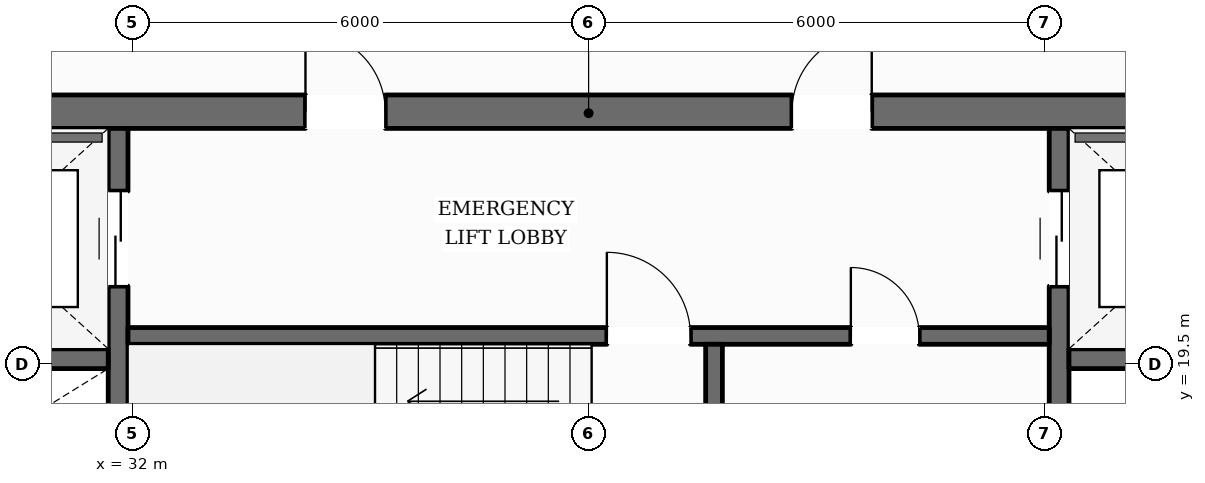
"""IFC4 building model, lengths in metres.
Left out: names, types, materials, properties, quantities, classifications, styles, units other than length and angle.
Written with IfcOpenShell. Run it as: python <this file> out.ifc"""

import sys

from ifc_helpers import new_model, si_unit, direction, frame, frame_2d, origin, place, context, subcontext, project, spatial, rectangle, extrude, element, fill, save


model = new_model("IFC4")
c1 = context("Model", 3, precision=1e-05, world=origin(), true_north=direction((0.0, 1.0)))
c2 = subcontext(c1, "Body", "Model", "MODEL_VIEW")
j1 = project(units=[si_unit("LENGTHUNIT", "METRE"), si_unit("PLANEANGLEUNIT", "RADIAN")], contexts=[c1])
p1 = place(None, origin())
s1 = spatial("IfcSite", under=j1, at=p1, CompositionType="ELEMENT")
p2 = place(p1, origin())
s2 = spatial("IfcBuilding", under=s1, at=p2, CompositionType="ELEMENT")
p3 = place(p2, frame((0.0, 0.0, 211.2)))
s3 = spatial("IfcBuildingStorey", under=s2, at=p3, CompositionType="ELEMENT", Elevation=211.2)
p4 = place(p3, frame((28.04, 22.82, 0.0), z_axis=(0.0, 0.0, 1.0), x_axis=(1.0, 0.0, 0.0)))
e1 = element("IfcWall", 1, at=p4, inside=s3, PredefinedType="SOLIDWALL", context=c2, shape_type="SweptSolid", body=[
    extrude(rectangle(XDim=19.92, YDim=0.44, at=frame_2d((9.96, 0.0))), origin(), (0.0, 0.0, 1.0), 3.6),
])
p5 = place(p4, frame((6.235, 0.0, 0.0)))
e2 = element("IfcOpeningElement", 2, at=p5, cuts=e1, PredefinedType="OPENING", context=c2, shape_type="SweptSolid", body=[
    extrude(rectangle(XDim=1.05, YDim=2.15, at=frame_2d((0.525, 1.075))), frame((0.0, 0.23, 0.0), z_axis=(0.0, -1.0, 0.0), x_axis=(1.0, 0.0, 0.0)), (0.0, 0.0, 1.0), 0.46),
])
p6 = place(p4, frame((12.635, 0.0, 0.0)))
e3 = element("IfcOpeningElement", 3, at=p6, cuts=e1, PredefinedType="OPENING", context=c2, shape_type="SweptSolid", body=[
    extrude(rectangle(XDim=1.05, YDim=2.15, at=frame_2d((0.525, 1.075))), frame((0.0, 0.23, 0.0), z_axis=(0.0, -1.0, 0.0), x_axis=(1.0, 0.0, 0.0)), (0.0, 0.0, 1.0), 0.46),
])
p7 = place(p3, frame((31.81, 9.6, 0.0), z_axis=(0.0, 0.0, 1.0), x_axis=(0.0, 1.0, 0.0)))
e4 = element("IfcWall", 4, at=p7, inside=s3, PredefinedType="SHEAR", context=c2, shape_type="SweptSolid", body=[
    extrude(rectangle(XDim=13.0, YDim=0.26, at=frame_2d((6.5, 0.0))), origin(), (0.0, 0.0, 1.0), 3.6),
])
p8 = place(p7, frame((10.925, 0.0, 0.0)))
e5 = element("IfcOpeningElement", 5, at=p8, cuts=e4, PredefinedType="OPENING", context=c2, shape_type="SweptSolid", body=[
    extrude(rectangle(XDim=1.25, YDim=2.25, at=frame_2d((0.625, 1.125))), frame((0.0, 0.14, 0.0), z_axis=(0.0, -1.0, 0.0), x_axis=(1.0, 0.0, 0.0)), (0.0, 0.0, 1.0), 0.28),
])
p9 = place(p3, frame((44.19, 9.6, 0.0), z_axis=(0.0, 0.0, 1.0), x_axis=(0.0, 1.0, 0.0)))
e6 = element("IfcWall", 6, at=p9, inside=s3, PredefinedType="SHEAR", context=c2, shape_type="SweptSolid", body=[
    extrude(rectangle(XDim=13.0, YDim=0.26, at=frame_2d((6.5, 0.0))), origin(), (0.0, 0.0, 1.0), 3.6),
])
p10 = place(p9, frame((10.925, 0.0, 0.0)))
e7 = element("IfcOpeningElement", 7, at=p10, cuts=e6, PredefinedType="OPENING", context=c2, shape_type="SweptSolid", body=[
    extrude(rectangle(XDim=1.25, YDim=2.25, at=frame_2d((0.625, 1.125))), frame((0.0, 0.14, 0.0), z_axis=(0.0, -1.0, 0.0), x_axis=(1.0, 0.0, 0.0)), (0.0, 0.0, 1.0), 0.28),
])
for number, where, z_axis, x_axis in (
    (8, (28.48, 19.57, 0.0), (0.0, 0.0, 1.0), (1.0, 0.0, 0.0)),
    (9, (44.32, 19.57, 0.0), (0.0, 0.0, 1.0), (1.0, 0.0, 0.0)),
):
    element("IfcWall", number, at=place(p3, frame(where, z_axis=z_axis, x_axis=x_axis)), inside=s3, PredefinedType="SHEAR", context=c2, shape_type="SweptSolid", body=[
        extrude(rectangle(XDim=3.2, YDim=0.26, at=frame_2d((1.6, 0.0))), origin(), (0.0, 0.0, 1.0), 3.6),
    ])
p11 = place(p3, frame((31.94, 19.87, 0.0), z_axis=(0.0, 0.0, 1.0), x_axis=(1.0, 0.0, 0.0)))
e10 = element("IfcWall", 10, at=p11, inside=s3, PredefinedType="SOLIDWALL", context=c2, shape_type="SweptSolid", body=[
    extrude(rectangle(XDim=12.12, YDim=0.22, at=frame_2d((6.06, 0.0))), origin(), (0.0, 0.0, 1.0), 3.6),
])
p12 = place(p11, frame((6.3, 0.0, 0.0)))
e11 = element("IfcOpeningElement", 11, at=p12, cuts=e10, PredefinedType="OPENING", context=c2, shape_type="SweptSolid", body=[
    extrude(rectangle(XDim=1.1, YDim=2.15, at=frame_2d((0.55, 1.075))), frame((0.0, 0.12, 0.0), z_axis=(0.0, -1.0, 0.0), x_axis=(1.0, 0.0, 0.0)), (0.0, 0.0, 1.0), 0.24),
])
p13 = place(p11, frame((9.51, 0.0, 0.0)))
e12 = element("IfcOpeningElement", 12, at=p13, cuts=e10, PredefinedType="OPENING", context=c2, shape_type="SweptSolid", body=[
    extrude(rectangle(XDim=0.9, YDim=2.1, at=frame_2d((0.45, 1.05))), frame((0.0, 0.12, 0.0), z_axis=(0.0, -1.0, 0.0), x_axis=(1.0, 0.0, 0.0)), (0.0, 0.0, 1.0), 0.24),
])
p14 = place(p3, frame((39.65, 16.56, 0.0), z_axis=(0.0, 0.0, 1.0), x_axis=(0.0, 1.0, 0.0)))
e13 = element("IfcWall", 13, at=p14, inside=s3, PredefinedType="SOLIDWALL", context=c2, shape_type="SweptSolid", body=[
    extrude(rectangle(XDim=3.2, YDim=0.22, at=frame_2d((1.6, 0.0))), origin(), (0.0, 0.0, 1.0), 3.6),
])
p15 = place(p3, frame((14.16, 10.888, 0.0), z_axis=(0.0, 0.0, 1.0), x_axis=(0.508058913236, 0.861322321017, 0.0)))
e14 = element("IfcWall", 14, at=p15, inside=s3, PredefinedType="STANDARD", context=c2, shape_type="SweptSolid", body=[
    extrude(rectangle(XDim=38.718, YDim=0.35, at=frame_2d((19.359, 0.0))), origin(), (0.0, 0.0, 1.0), 3.132),
])
p16 = place(p15, frame((34.374, 0.0, 0.65)))
e15 = element("IfcOpeningElement", 15, at=p16, cuts=e14, PredefinedType="OPENING", context=c2, shape_type="SweptSolid", body=[
    extrude(rectangle(XDim=1.45, YDim=1.75, at=frame_2d((0.725, 0.875))), frame((0.0, 0.185, 0.0), z_axis=(0.0, -1.0, 0.0), x_axis=(1.0, 0.0, 0.0)), (0.0, 0.0, 1.0), 0.37),
])
p17 = place(p15, frame((28.08, 0.0, 0.65)))
e16 = element("IfcOpeningElement", 16, at=p17, cuts=e14, PredefinedType="OPENING", context=c2, shape_type="SweptSolid", body=[
    extrude(rectangle(XDim=1.45, YDim=1.75, at=frame_2d((0.725, 0.875))), frame((0.0, 0.185, 0.0), z_axis=(0.0, -1.0, 0.0), x_axis=(1.0, 0.0, 0.0)), (0.0, 0.0, 1.0), 0.37),
])
p18 = place(p15, frame((15.491, 0.0, 0.65)))
e17 = element("IfcOpeningElement", 17, at=p18, cuts=e14, PredefinedType="OPENING", context=c2, shape_type="SweptSolid", body=[
    extrude(rectangle(XDim=1.45, YDim=1.75, at=frame_2d((0.725, 0.875))), frame((0.0, 0.185, 0.0), z_axis=(0.0, -1.0, 0.0), x_axis=(1.0, 0.0, 0.0)), (0.0, 0.0, 1.0), 0.37),
])
p19 = place(p15, frame((9.197, 0.0, 0.65)))
e18 = element("IfcOpeningElement", 18, at=p19, cuts=e14, PredefinedType="OPENING", context=c2, shape_type="SweptSolid", body=[
    extrude(rectangle(XDim=1.45, YDim=1.75, at=frame_2d((0.725, 0.875))), frame((0.0, 0.185, 0.0), z_axis=(0.0, -1.0, 0.0), x_axis=(1.0, 0.0, 0.0)), (0.0, 0.0, 1.0), 0.37),
])
p20 = place(p15, frame((2.903, 0.0, 0.65)))
e19 = element("IfcOpeningElement", 19, at=p20, cuts=e14, PredefinedType="OPENING", context=c2, shape_type="SweptSolid", body=[
    extrude(rectangle(XDim=1.45, YDim=1.75, at=frame_2d((0.725, 0.875))), frame((0.0, 0.185, 0.0), z_axis=(0.0, -1.0, 0.0), x_axis=(1.0, 0.0, 0.0)), (0.0, 0.0, 1.0), 0.37),
])
p21 = place(p3, frame((42.066, 44.299, 0.0), z_axis=(0.0, 0.0, 1.0), x_axis=(0.502188775534, -0.864758020331, 0.0)))
e20 = element("IfcWall", 20, at=p21, inside=s3, PredefinedType="STANDARD", context=c2, shape_type="SweptSolid", body=[
    extrude(rectangle(XDim=38.263, YDim=0.35, at=frame_2d((19.132, 0.0))), origin(), (0.0, 0.0, 1.0), 3.132),
])
p22 = place(p21, frame((33.948, 0.0, 0.65)))
e21 = element("IfcOpeningElement", 21, at=p22, cuts=e20, PredefinedType="OPENING", context=c2, shape_type="SweptSolid", body=[
    extrude(rectangle(XDim=1.45, YDim=1.75, at=frame_2d((0.725, 0.875))), frame((0.0, 0.185, 0.0), z_axis=(0.0, -1.0, 0.0), x_axis=(1.0, 0.0, 0.0)), (0.0, 0.0, 1.0), 0.37),
])
p23 = place(p21, frame((27.731, 0.0, 0.65)))
e22 = element("IfcOpeningElement", 22, at=p23, cuts=e20, PredefinedType="OPENING", context=c2, shape_type="SweptSolid", body=[
    extrude(rectangle(XDim=1.45, YDim=1.75, at=frame_2d((0.725, 0.875))), frame((0.0, 0.185, 0.0), z_axis=(0.0, -1.0, 0.0), x_axis=(1.0, 0.0, 0.0)), (0.0, 0.0, 1.0), 0.37),
])
p24 = place(p21, frame((15.297, 0.0, 0.65)))
e23 = element("IfcOpeningElement", 23, at=p24, cuts=e20, PredefinedType="OPENING", context=c2, shape_type="SweptSolid", body=[
    extrude(rectangle(XDim=1.45, YDim=1.75, at=frame_2d((0.725, 0.875))), frame((0.0, 0.185, 0.0), z_axis=(0.0, -1.0, 0.0), x_axis=(1.0, 0.0, 0.0)), (0.0, 0.0, 1.0), 0.37),
])
p25 = place(p21, frame((9.079, 0.0, 0.65)))
e24 = element("IfcOpeningElement", 24, at=p25, cuts=e20, PredefinedType="OPENING", context=c2, shape_type="SweptSolid", body=[
    extrude(rectangle(XDim=1.45, YDim=1.75, at=frame_2d((0.725, 0.875))), frame((0.0, 0.185, 0.0), z_axis=(0.0, -1.0, 0.0), x_axis=(1.0, 0.0, 0.0)), (0.0, 0.0, 1.0), 0.37),
])
p26 = place(p21, frame((2.862, 0.0, 0.65)))
e25 = element("IfcOpeningElement", 25, at=p26, cuts=e20, PredefinedType="OPENING", context=c2, shape_type="SweptSolid", body=[
    extrude(rectangle(XDim=1.45, YDim=1.75, at=frame_2d((0.725, 0.875))), frame((0.0, 0.185, 0.0), z_axis=(0.0, -1.0, 0.0), x_axis=(1.0, 0.0, 0.0)), (0.0, 0.0, 1.0), 0.37),
])
p27 = place(p12, origin())
e26 = element("IfcDoor", 26, at=p27, inside=s3, OperationType="SINGLE_SWING_LEFT", PredefinedType="DOOR", context=c2, shape_type="SweptSolid", body=[
    extrude(rectangle(XDim=1.1, YDim=2.15, at=frame_2d((0.55, 1.075))), frame((0.0, 0.025, 0.0), z_axis=(0.0, -1.0, 0.0), x_axis=(1.0, 0.0, 0.0)), (0.0, 0.0, 1.0), 0.05),
])
fill(e11, e26)
p28 = place(p5, origin())
e27 = element("IfcDoor", 27, at=p28, inside=s3, OperationType="SINGLE_SWING_LEFT", PredefinedType="DOOR", context=c2, shape_type="SweptSolid", body=[
    extrude(rectangle(XDim=1.05, YDim=2.15, at=frame_2d((0.525, 1.075))), frame((0.0, 0.025, 0.0), z_axis=(0.0, -1.0, 0.0), x_axis=(1.0, 0.0, 0.0)), (0.0, 0.0, 1.0), 0.05),
])
fill(e2, e27)
p29 = place(p6, origin())
e28 = element("IfcDoor", 28, at=p29, inside=s3, OperationType="SINGLE_SWING_RIGHT", PredefinedType="DOOR", context=c2, shape_type="SweptSolid", body=[
    extrude(rectangle(XDim=1.05, YDim=2.15, at=frame_2d((0.525, 1.075))), frame((0.0, 0.025, 0.0), z_axis=(0.0, -1.0, 0.0), x_axis=(1.0, 0.0, 0.0)), (0.0, 0.0, 1.0), 0.05),
])
fill(e3, e28)
p30 = place(p8, origin())
e29 = element("IfcDoor", 29, at=p30, inside=s3, OperationType="DOUBLE_DOOR_SLIDING", PredefinedType="DOOR", context=c2, shape_type="SweptSolid", body=[
    extrude(rectangle(XDim=1.25, YDim=2.25, at=frame_2d((0.625, 1.125))), frame((0.0, 0.025, 0.0), z_axis=(0.0, -1.0, 0.0), x_axis=(1.0, 0.0, 0.0)), (0.0, 0.0, 1.0), 0.05),
])
fill(e5, e29)
p31 = place(p10, origin())
e30 = element("IfcDoor", 30, at=p31, inside=s3, OperationType="DOUBLE_DOOR_SLIDING", PredefinedType="DOOR", context=c2, shape_type="SweptSolid", body=[
    extrude(rectangle(XDim=1.25, YDim=2.25, at=frame_2d((0.625, 1.125))), frame((0.0, 0.025, 0.0), z_axis=(0.0, -1.0, 0.0), x_axis=(1.0, 0.0, 0.0)), (0.0, 0.0, 1.0), 0.05),
])
fill(e7, e30)
p32 = place(p13, origin())
e31 = element("IfcDoor", 31, at=p32, inside=s3, OperationType="SINGLE_SWING_LEFT", PredefinedType="DOOR", context=c2, shape_type="SweptSolid", body=[
    extrude(rectangle(XDim=0.9, YDim=2.1, at=frame_2d((0.45, 1.05))), frame((0.0, 0.025, 0.0), z_axis=(0.0, -1.0, 0.0), x_axis=(1.0, 0.0, 0.0)), (0.0, 0.0, 1.0), 0.05),
])
fill(e12, e31)
save(model, sys.argv[1])
